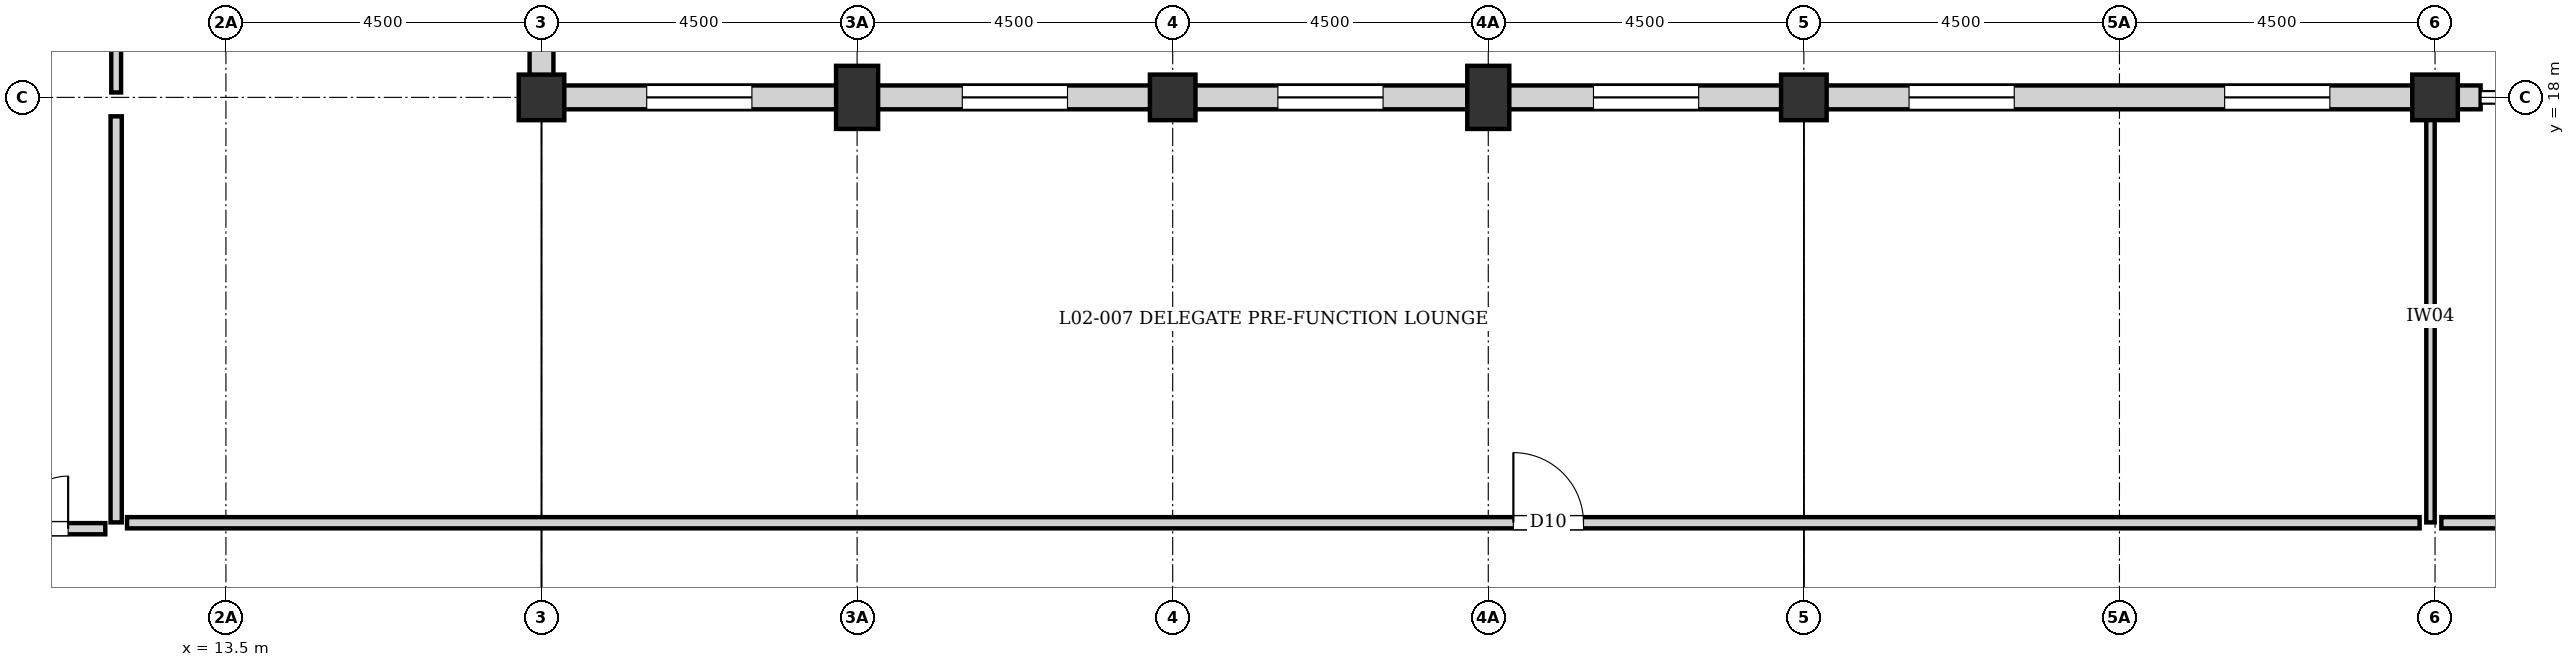
"""IFC4 building model, lengths in metres.
Left out: names, types, materials, properties, quantities, classifications, styles, units other than length and angle.
Written with IfcOpenShell. Run it as: python <this file> out.ifc"""

import sys

from ifc_helpers import new_model, si_unit, direction, frame, frame_2d, origin, origin_2d, place, context, subcontext, project, spatial, rectangle, extrude, element, fill, save


model = new_model("IFC4")
c1 = context("Model", 3, precision=1e-05, world=origin(), true_north=direction((0.0, 1.0)))
c2 = subcontext(c1, "Body", "Model", "MODEL_VIEW")
j1 = project(units=[si_unit("LENGTHUNIT", "METRE"), si_unit("PLANEANGLEUNIT", "RADIAN")], contexts=[c1])
p1 = place(None, origin())
s1 = spatial("IfcSite", under=j1, at=p1, CompositionType="ELEMENT")
p2 = place(p1, origin())
s2 = spatial("IfcBuilding", under=s1, at=p2, CompositionType="ELEMENT")
p3 = place(p2, frame((0.0, 0.0, 8.16)))
s3 = spatial("IfcBuildingStorey", under=s2, at=p3, CompositionType="ELEMENT", Elevation=8.16)
for number, where, z_axis, x_axis in (
    (1, (18.0, 18.0, 0.0), (0.0, 0.0, 1.0), (1.0, 0.0, 0.0)),
    (2, (27.0, 18.0, 0.0), (0.0, 0.0, 1.0), (1.0, 0.0, 0.0)),
    (3, (36.0, 18.0, 0.0), (0.0, 0.0, 1.0), (1.0, 0.0, 0.0)),
    (4, (45.0, 18.0, 0.0), (0.0, 0.0, 1.0), (1.0, 0.0, 0.0)),
):
    element("IfcColumn", number, at=place(p3, frame(where, z_axis=z_axis, x_axis=x_axis)), inside=s3, PredefinedType="COLUMN", context=c2, shape_type="SweptSolid", body=[
        extrude(rectangle(XDim=0.65, YDim=0.65, at=origin_2d()), origin(), (0.0, 0.0, 1.0), 3.36),
    ])
for number, where, z_axis, x_axis in (
    (5, (22.5, 18.0, 0.0), (0.0, 0.0, 1.0), (1.0, 0.0, 0.0)),
    (6, (31.5, 18.0, 0.0), (0.0, 0.0, 1.0), (1.0, 0.0, 0.0)),
):
    element("IfcColumn", number, at=place(p3, frame(where, z_axis=z_axis, x_axis=x_axis)), inside=s3, PredefinedType="PILASTER", context=c2, shape_type="SweptSolid", body=[
        extrude(rectangle(XDim=0.6, YDim=0.9, at=origin_2d()), origin(), (0.0, 0.0, 1.0), 3.36),
    ])
p4 = place(p3, frame((18.0, 27.0, 0.0), z_axis=(0.0, 0.0, 1.0), x_axis=(0.0, -1.0, 0.0)))
e7 = element("IfcWall", 7, at=p4, inside=s3, PredefinedType="SOLIDWALL", context=c2, shape_type="SweptSolid", body=[
    extrude(rectangle(XDim=8.845, YDim=0.34, at=frame_2d((4.422, 0.0))), origin(), (0.0, 0.0, 1.0), 2.7),
])
p5 = place(p4, frame((1.5, 0.0, 0.35)))
e8 = element("IfcOpeningElement", 8, at=p5, cuts=e7, PredefinedType="OPENING", context=c2, shape_type="SweptSolid", body=[
    extrude(rectangle(XDim=1.5, YDim=1.8, at=frame_2d((0.75, 0.9))), frame((0.0, 0.18, 0.0), z_axis=(0.0, -1.0, 0.0), x_axis=(1.0, 0.0, 0.0)), (0.0, 0.0, 1.0), 0.36),
])
p6 = place(p4, frame((6.0, 0.0, 0.35)))
e9 = element("IfcOpeningElement", 9, at=p6, cuts=e7, PredefinedType="OPENING", context=c2, shape_type="SweptSolid", body=[
    extrude(rectangle(XDim=1.5, YDim=1.8, at=frame_2d((0.75, 0.9))), frame((0.0, 0.18, 0.0), z_axis=(0.0, -1.0, 0.0), x_axis=(1.0, 0.0, 0.0)), (0.0, 0.0, 1.0), 0.36),
])
p7 = place(p3, frame((18.0, 18.0, 0.0), z_axis=(0.0, 0.0, 1.0), x_axis=(1.0, 0.0, 0.0)))
e10 = element("IfcWall", 10, at=p7, inside=s3, PredefinedType="SOLIDWALL", context=c2, shape_type="SweptSolid", body=[
    extrude(rectangle(XDim=9.0, YDim=0.34, at=frame_2d((4.5, 0.0))), origin(), (0.0, 0.0, 1.0), 2.74),
])
p8 = place(p7, frame((1.5, 0.0, 0.35)))
e11 = element("IfcOpeningElement", 11, at=p8, cuts=e10, PredefinedType="OPENING", context=c2, shape_type="SweptSolid", body=[
    extrude(rectangle(XDim=1.5, YDim=1.8, at=frame_2d((0.75, 0.9))), frame((0.0, 0.18, 0.0), z_axis=(0.0, -1.0, 0.0), x_axis=(1.0, 0.0, 0.0)), (0.0, 0.0, 1.0), 0.36),
])
p9 = place(p7, frame((6.0, 0.0, 0.35)))
e12 = element("IfcOpeningElement", 12, at=p9, cuts=e10, PredefinedType="OPENING", context=c2, shape_type="SweptSolid", body=[
    extrude(rectangle(XDim=1.5, YDim=1.8, at=frame_2d((0.75, 0.9))), frame((0.0, 0.18, 0.0), z_axis=(0.0, -1.0, 0.0), x_axis=(1.0, 0.0, 0.0)), (0.0, 0.0, 1.0), 0.36),
])
p10 = place(p3, frame((27.0, 18.0, 0.0), z_axis=(0.0, 0.0, 1.0), x_axis=(1.0, 0.0, 0.0)))
e13 = element("IfcWall", 13, at=p10, inside=s3, PredefinedType="SOLIDWALL", context=c2, shape_type="SweptSolid", body=[
    extrude(rectangle(XDim=9.0, YDim=0.34, at=frame_2d((4.5, 0.0))), origin(), (0.0, 0.0, 1.0), 2.7),
])
p11 = place(p10, frame((1.5, 0.0, 0.35)))
e14 = element("IfcOpeningElement", 14, at=p11, cuts=e13, PredefinedType="OPENING", context=c2, shape_type="SweptSolid", body=[
    extrude(rectangle(XDim=1.5, YDim=1.8, at=frame_2d((0.75, 0.9))), frame((0.0, 0.18, 0.0), z_axis=(0.0, -1.0, 0.0), x_axis=(1.0, 0.0, 0.0)), (0.0, 0.0, 1.0), 0.36),
])
p12 = place(p10, frame((6.0, 0.0, 0.35)))
e15 = element("IfcOpeningElement", 15, at=p12, cuts=e13, PredefinedType="OPENING", context=c2, shape_type="SweptSolid", body=[
    extrude(rectangle(XDim=1.5, YDim=1.8, at=frame_2d((0.75, 0.9))), frame((0.0, 0.18, 0.0), z_axis=(0.0, -1.0, 0.0), x_axis=(1.0, 0.0, 0.0)), (0.0, 0.0, 1.0), 0.36),
])
p13 = place(p3, frame((36.0, 18.0, 0.0), z_axis=(0.0, 0.0, 1.0), x_axis=(1.0, 0.0, 0.0)))
e16 = element("IfcWall", 16, at=p13, inside=s3, PredefinedType="SOLIDWALL", context=c2, shape_type="SweptSolid", body=[
    extrude(rectangle(XDim=9.0, YDim=0.34, at=frame_2d((4.5, 0.0))), origin(), (0.0, 0.0, 1.0), 2.87),
])
p14 = place(p13, frame((1.5, 0.0, 0.35)))
e17 = element("IfcOpeningElement", 17, at=p14, cuts=e16, PredefinedType="OPENING", context=c2, shape_type="SweptSolid", body=[
    extrude(rectangle(XDim=1.5, YDim=1.8, at=frame_2d((0.75, 0.9))), frame((0.0, 0.18, 0.0), z_axis=(0.0, -1.0, 0.0), x_axis=(1.0, 0.0, 0.0)), (0.0, 0.0, 1.0), 0.36),
])
p15 = place(p13, frame((6.0, 0.0, 0.35)))
e18 = element("IfcOpeningElement", 18, at=p15, cuts=e16, PredefinedType="OPENING", context=c2, shape_type="SweptSolid", body=[
    extrude(rectangle(XDim=1.5, YDim=1.8, at=frame_2d((0.75, 0.9))), frame((0.0, 0.18, 0.0), z_axis=(0.0, -1.0, 0.0), x_axis=(1.0, 0.0, 0.0)), (0.0, 0.0, 1.0), 0.36),
])
p16 = place(p3, frame((45.0, 18.0, 0.0), z_axis=(0.0, 0.0, 1.0), x_axis=(1.0, 0.0, 0.0)))
e19 = element("IfcWall", 19, at=p16, inside=s3, PredefinedType="SOLIDWALL", context=c2, shape_type="SweptSolid", body=[
    extrude(rectangle(XDim=0.65, YDim=0.34, at=frame_2d((0.325, 0.0))), origin(), (0.0, 0.0, 1.0), 2.8),
])
p17 = place(p3, frame((11.935, 11.94, 0.0), z_axis=(0.0, 0.0, 1.0), x_axis=(0.0, 1.0, 0.0)))
e20 = element("IfcWall", 20, at=p17, inside=s3, PredefinedType="PARTITIONING", context=c2, shape_type="SweptSolid", body=[
    extrude(rectangle(XDim=5.79, YDim=0.16, at=frame_2d((2.895, 0.0))), origin(), (0.0, 0.0, 1.0), 3.14),
])
p18 = place(p3, frame((44.935, 11.94, 0.0), z_axis=(0.0, 0.0, 1.0), x_axis=(0.0, 1.0, 0.0)))
e21 = element("IfcWall", 21, at=p18, inside=s3, PredefinedType="PARTITIONING", context=c2, shape_type="SweptSolid", body=[
    extrude(rectangle(XDim=5.885, YDim=0.12, at=frame_2d((2.942, 0.0))), origin(), (0.0, 0.0, 1.0), 2.66),
])
p19 = place(p3, frame((9.22, 11.85, 0.0), z_axis=(0.0, 0.0, 1.0), x_axis=(1.0, 0.0, 0.0)))
e22 = element("IfcWall", 22, at=p19, inside=s3, PredefinedType="PARTITIONING", context=c2, shape_type="SweptSolid", body=[
    extrude(rectangle(XDim=2.56, YDim=0.16, at=frame_2d((1.28, 0.0))), origin(), (0.0, 0.0, 1.0), 3.14),
])
p20 = place(p19, frame((0.53, 0.0, 0.0)))
e23 = element("IfcOpeningElement", 23, at=p20, cuts=e22, PredefinedType="OPENING", context=c2, shape_type="SweptSolid", body=[
    extrude(rectangle(XDim=1.5, YDim=2.1, at=frame_2d((0.75, 1.05))), frame((0.0, 0.09, 0.0), z_axis=(0.0, -1.0, 0.0), x_axis=(1.0, 0.0, 0.0)), (0.0, 0.0, 1.0), 0.18),
])
p21 = place(p3, frame((12.09, 11.935, 0.0), z_axis=(0.0, 0.0, 1.0), x_axis=(1.0, 0.0, 0.0)))
e24 = element("IfcWall", 24, at=p21, inside=s3, PredefinedType="PARTITIONING", context=c2, shape_type="SweptSolid", body=[
    extrude(rectangle(XDim=32.69, YDim=0.16, at=frame_2d((16.345, 0.0))), origin(), (0.0, 0.0, 1.0), 3.14),
])
p22 = place(p21, frame((19.768, 0.0, 0.0)))
e25 = element("IfcOpeningElement", 25, at=p22, cuts=e24, PredefinedType="OPENING", context=c2, shape_type="SweptSolid", body=[
    extrude(rectangle(XDim=1.0, YDim=2.1, at=frame_2d((0.5, 1.05))), frame((0.0, 0.09, 0.0), z_axis=(0.0, -1.0, 0.0), x_axis=(1.0, 0.0, 0.0)), (0.0, 0.0, 1.0), 0.18),
])
p23 = place(p3, frame((45.09, 11.935, 0.0), z_axis=(0.0, 0.0, 1.0), x_axis=(1.0, 0.0, 0.0)))
e26 = element("IfcWall", 26, at=p23, inside=s3, PredefinedType="PARTITIONING", context=c2, shape_type="SweptSolid", body=[
    extrude(rectangle(XDim=26.735, YDim=0.16, at=frame_2d((13.367, 0.0))), origin(), (0.0, 0.0, 1.0), 3.14),
])
p24 = place(p23, frame((12.867, 0.0, 0.0)))
e27 = element("IfcOpeningElement", 27, at=p24, cuts=e26, PredefinedType="OPENING", context=c2, shape_type="SweptSolid", body=[
    extrude(rectangle(XDim=1.0, YDim=2.1, at=frame_2d((0.5, 1.05))), frame((0.0, 0.09, 0.0), z_axis=(0.0, -1.0, 0.0), x_axis=(1.0, 0.0, 0.0)), (0.0, 0.0, 1.0), 0.18),
])
p25 = place(p3, frame((11.935, 18.07, 0.0), z_axis=(0.0, 0.0, 1.0), x_axis=(0.0, 1.0, 0.0)))
e28 = element("IfcWall", 28, at=p25, inside=s3, PredefinedType="PLUMBINGWALL", context=c2, shape_type="SweptSolid", body=[
    extrude(rectangle(XDim=4.21, YDim=0.14, at=frame_2d((2.105, 0.0))), origin(), (0.0, 0.0, 1.0), 3.14),
])
p26 = place(p25, frame((2.16, 0.0, 0.0)))
e29 = element("IfcOpeningElement", 29, at=p26, cuts=e28, PredefinedType="OPENING", context=c2, shape_type="SweptSolid", body=[
    extrude(rectangle(XDim=0.9, YDim=2.1, at=frame_2d((0.45, 1.05))), frame((0.0, 0.08, 0.0), z_axis=(0.0, -1.0, 0.0), x_axis=(1.0, 0.0, 0.0)), (0.0, 0.0, 1.0), 0.16),
])
p27 = place(p8, origin())
e30 = element("IfcWindow", 30, at=p27, inside=s3, PartitioningType="SINGLE_PANEL", PredefinedType="WINDOW", context=c2, shape_type="SweptSolid", body=[
    extrude(rectangle(XDim=1.5, YDim=1.8, at=frame_2d((0.75, 0.9))), frame((0.0, 0.03, 0.0), z_axis=(0.0, -1.0, 0.0), x_axis=(1.0, 0.0, 0.0)), (0.0, 0.0, 1.0), 0.06),
])
fill(e11, e30)
p28 = place(p9, origin())
e31 = element("IfcWindow", 31, at=p28, inside=s3, PartitioningType="SINGLE_PANEL", PredefinedType="WINDOW", context=c2, shape_type="SweptSolid", body=[
    extrude(rectangle(XDim=1.5, YDim=1.8, at=frame_2d((0.75, 0.9))), frame((0.0, 0.03, 0.0), z_axis=(0.0, -1.0, 0.0), x_axis=(1.0, 0.0, 0.0)), (0.0, 0.0, 1.0), 0.06),
])
fill(e12, e31)
p29 = place(p11, origin())
e32 = element("IfcWindow", 32, at=p29, inside=s3, PartitioningType="SINGLE_PANEL", PredefinedType="WINDOW", context=c2, shape_type="SweptSolid", body=[
    extrude(rectangle(XDim=1.5, YDim=1.8, at=frame_2d((0.75, 0.9))), frame((0.0, 0.03, 0.0), z_axis=(0.0, -1.0, 0.0), x_axis=(1.0, 0.0, 0.0)), (0.0, 0.0, 1.0), 0.06),
])
fill(e14, e32)
p30 = place(p12, origin())
e33 = element("IfcWindow", 33, at=p30, inside=s3, PartitioningType="SINGLE_PANEL", PredefinedType="WINDOW", context=c2, shape_type="SweptSolid", body=[
    extrude(rectangle(XDim=1.5, YDim=1.8, at=frame_2d((0.75, 0.9))), frame((0.0, 0.03, 0.0), z_axis=(0.0, -1.0, 0.0), x_axis=(1.0, 0.0, 0.0)), (0.0, 0.0, 1.0), 0.06),
])
fill(e15, e33)
p31 = place(p14, origin())
e34 = element("IfcWindow", 34, at=p31, inside=s3, PartitioningType="SINGLE_PANEL", PredefinedType="WINDOW", context=c2, shape_type="SweptSolid", body=[
    extrude(rectangle(XDim=1.5, YDim=1.8, at=frame_2d((0.75, 0.9))), frame((0.0, 0.03, 0.0), z_axis=(0.0, -1.0, 0.0), x_axis=(1.0, 0.0, 0.0)), (0.0, 0.0, 1.0), 0.06),
])
fill(e17, e34)
p32 = place(p15, origin())
e35 = element("IfcWindow", 35, at=p32, inside=s3, PartitioningType="SINGLE_PANEL", PredefinedType="WINDOW", context=c2, shape_type="SweptSolid", body=[
    extrude(rectangle(XDim=1.5, YDim=1.8, at=frame_2d((0.75, 0.9))), frame((0.0, 0.03, 0.0), z_axis=(0.0, -1.0, 0.0), x_axis=(1.0, 0.0, 0.0)), (0.0, 0.0, 1.0), 0.06),
])
fill(e18, e35)
p33 = place(p20, origin())
e36 = element("IfcDoor", 36, at=p33, inside=s3, OperationType="DOUBLE_DOOR_SINGLE_SWING", PredefinedType="DOOR", context=c2, shape_type="SweptSolid", body=[
    extrude(rectangle(XDim=1.5, YDim=2.1, at=frame_2d((0.75, 1.05))), frame((0.0, 0.025, 0.0), z_axis=(0.0, -1.0, 0.0), x_axis=(1.0, 0.0, 0.0)), (0.0, 0.0, 1.0), 0.05),
])
fill(e23, e36)
p34 = place(p22, origin())
e37 = element("IfcDoor", 37, at=p34, inside=s3, OperationType="SINGLE_SWING_LEFT", PredefinedType="DOOR", context=c2, shape_type="SweptSolid", body=[
    extrude(rectangle(XDim=1.0, YDim=2.1, at=frame_2d((0.5, 1.05))), frame((0.0, 0.025, 0.0), z_axis=(0.0, -1.0, 0.0), x_axis=(1.0, 0.0, 0.0)), (0.0, 0.0, 1.0), 0.05),
])
fill(e25, e37)
save(model, sys.argv[1])
